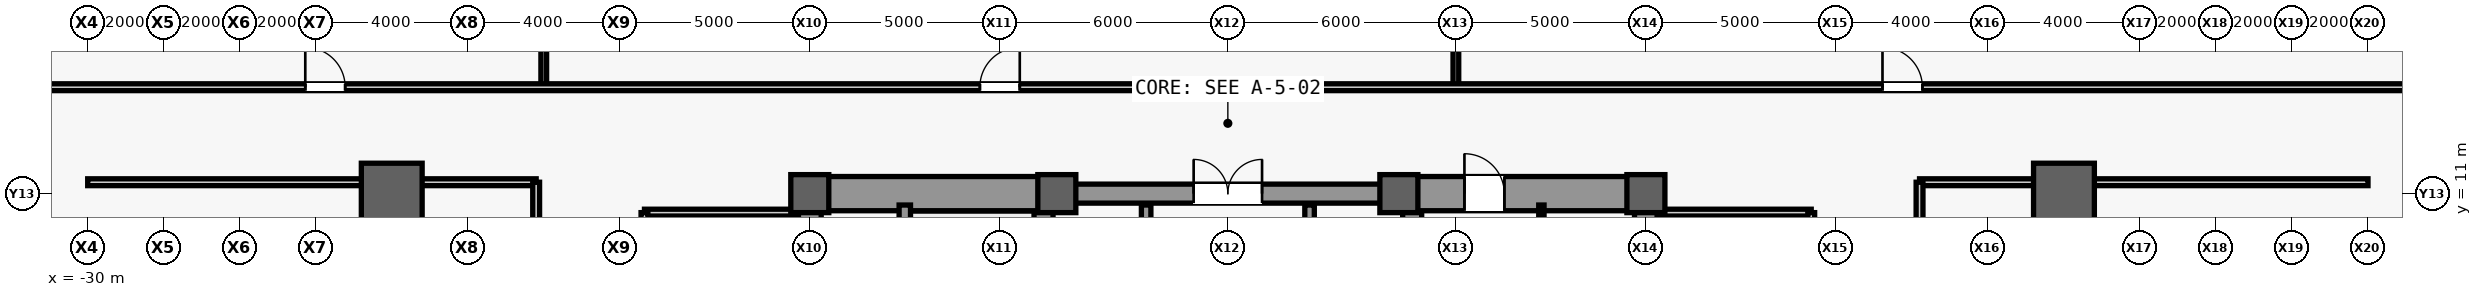
"""IFC4 building model, lengths in metres.
Left out: names, types, materials, properties, quantities, classifications, styles, units other than length and angle.
Written with IfcOpenShell. Run it as: python <this file> out.ifc"""

import sys

from ifc_helpers import new_model, si_unit, direction, frame, frame_2d, origin, origin_2d, place, context, subcontext, project, spatial, rectangle, extrude, source, transform, mapped, element, fill, save


model = new_model("IFC4")
c1 = context("Model", 3, precision=1e-05, world=origin(), true_north=direction((0.0, 1.0)))
c2 = subcontext(c1, "Body", "Model", "MODEL_VIEW")
j1 = project(units=[si_unit("LENGTHUNIT", "METRE"), si_unit("PLANEANGLEUNIT", "RADIAN")], contexts=[c1])
p1 = place(None, origin())
s1 = spatial("IfcSite", under=j1, at=p1, CompositionType="ELEMENT")
p2 = place(p1, origin())
s2 = spatial("IfcBuilding", under=s1, at=p2, CompositionType="ELEMENT")
p3 = place(p2, frame((0.0, 0.0, 12.0)))
s3 = spatial("IfcBuildingStorey", under=s2, at=p3, CompositionType="ELEMENT", Elevation=12.0)
m1 = source(origin(), c2, "Body", "SweptSolid", [
    extrude(rectangle(XDim=22.0, YDim=0.6, at=frame_2d((11.0, 0.0))), origin(), (0.0, 0.0, 1.0), 5.08),
])
p4 = place(p3, frame((-11.0, -11.0, 0.0), z_axis=(0.0, 0.0, 1.0), x_axis=(0.0, 1.0, 0.0)))
e1 = element("IfcWall", 1, at=p4, inside=s3, PredefinedType="SHEAR", context=c2, shape_type="MappedRepresentation", body=[
    mapped(m1, transform((0.0, 0.0, 0.0), scale=1.0)),
])
m2 = source(origin(), c2, "Body", "SweptSolid", [
    extrude(rectangle(XDim=1.1, YDim=2.2, at=frame_2d((0.55, 1.1))), frame((0.0, 0.31, 0.0), z_axis=(0.0, -1.0, 0.0), x_axis=(1.0, 0.0, 0.0)), (0.0, 0.0, 1.0), 0.62),
])
p5 = place(p4, frame((0.8, 0.0, 0.0)))
e2 = element("IfcOpeningElement", 2, at=p5, cuts=e1, PredefinedType="OPENING", context=c2, shape_type="MappedRepresentation", body=[
    mapped(m2, transform((0.0, 0.0, 0.0), scale=1.0)),
])
p6 = place(p4, frame((12.5, 0.0, 0.0)))
e3 = element("IfcOpeningElement", 3, at=p6, cuts=e1, PredefinedType="OPENING", context=c2, shape_type="MappedRepresentation", body=[
    mapped(m2, transform((0.0, 0.0, 0.0), scale=1.0)),
])
m3 = source(origin(), c2, "Body", "SweptSolid", [
    extrude(rectangle(XDim=0.9, YDim=2.15, at=frame_2d((0.45, 1.075))), frame((0.0, 0.31, 0.0), z_axis=(0.0, -1.0, 0.0), x_axis=(1.0, 0.0, 0.0)), (0.0, 0.0, 1.0), 0.62),
])
p7 = place(p4, frame((6.85, 0.0, 0.0)))
e4 = element("IfcOpeningElement", 4, at=p7, cuts=e1, PredefinedType="OPENING", context=c2, shape_type="MappedRepresentation", body=[
    mapped(m3, transform((0.0, 0.0, 0.0), scale=1.0)),
])
m4 = source(origin(), c2, "Body", "SweptSolid", [
    extrude(rectangle(XDim=1.3, YDim=2.3, at=frame_2d((0.65, 1.15))), frame((0.0, 0.31, 0.0), z_axis=(0.0, -1.0, 0.0), x_axis=(1.0, 0.0, 0.0)), (0.0, 0.0, 1.0), 0.62),
])
p8 = place(p4, frame((2.7, 0.0, 0.0)))
e5 = element("IfcOpeningElement", 5, at=p8, cuts=e1, PredefinedType="OPENING", context=c2, shape_type="MappedRepresentation", body=[
    mapped(m4, transform((0.0, 0.0, 0.0), scale=1.0)),
])
p9 = place(p3, frame((11.0, -11.0, 0.0), z_axis=(0.0, 0.0, 1.0), x_axis=(0.0, 1.0, 0.0)))
e6 = element("IfcWall", 6, at=p9, inside=s3, PredefinedType="SHEAR", context=c2, shape_type="MappedRepresentation", body=[
    mapped(m1, transform((0.0, 0.0, 0.0), scale=1.0)),
])
p10 = place(p9, frame((0.8, 0.0, 0.0)))
e7 = element("IfcOpeningElement", 7, at=p10, cuts=e6, PredefinedType="OPENING", context=c2, shape_type="MappedRepresentation", body=[
    mapped(m2, transform((0.0, 0.0, 0.0), scale=1.0)),
])
p11 = place(p9, frame((6.2, 0.0, 0.0)))
e8 = element("IfcOpeningElement", 8, at=p11, cuts=e6, PredefinedType="OPENING", context=c2, shape_type="MappedRepresentation", body=[
    mapped(m3, transform((0.0, 0.0, 0.0), scale=1.0)),
])
p12 = place(p9, frame((8.05, 0.0, 0.0)))
e9 = element("IfcOpeningElement", 9, at=p12, cuts=e6, PredefinedType="OPENING", context=c2, shape_type="MappedRepresentation", body=[
    mapped(m3, transform((0.0, 0.0, 0.0), scale=1.0)),
])
p13 = place(p9, frame((2.7, 0.0, 0.0)))
e10 = element("IfcOpeningElement", 10, at=p13, cuts=e6, PredefinedType="OPENING", context=c2, shape_type="MappedRepresentation", body=[
    mapped(m4, transform((0.0, 0.0, 0.0), scale=1.0)),
])
p14 = place(p9, frame((13.35, 0.0, 0.0)))
e11 = element("IfcOpeningElement", 11, at=p14, cuts=e6, PredefinedType="OPENING", context=c2, shape_type="MappedRepresentation", body=[
    mapped(m4, transform((0.0, 0.0, 0.0), scale=1.0)),
])
m5 = source(origin(), c2, "Body", "SweptSolid", [
    extrude(rectangle(XDim=21.4, YDim=0.5, at=frame_2d((10.7, 0.0))), origin(), (0.0, 0.0, 1.0), 5.08),
])
for number, where, z_axis, x_axis in (
    (12, (-4.85, -10.7, 0.0), (0.0, 0.0, 1.0), (0.0, 1.0, 0.0)),
    (13, (4.85, -10.7, 0.0), (0.0, 0.0, 1.0), (0.0, 1.0, 0.0)),
):
    element("IfcWall", number, at=place(p3, frame(where, z_axis=z_axis, x_axis=x_axis)), inside=s3, PredefinedType="SHEAR", context=c2, shape_type="MappedRepresentation", body=[
        mapped(m5, transform((0.0, 0.0, 0.0), scale=1.0)),
    ])
m6 = source(origin(), c2, "Body", "SweptSolid", [
    extrude(rectangle(XDim=5.85, YDim=0.9, at=frame_2d((2.925, 0.0))), origin(), (0.0, 0.0, 1.0), 5.08),
])
p15 = place(p3, frame((-10.7, 11.0, 0.0), z_axis=(0.0, 0.0, 1.0), x_axis=(1.0, 0.0, 0.0)))
e14 = element("IfcWall", 14, at=p15, inside=s3, PredefinedType="SHEAR", context=c2, shape_type="MappedRepresentation", body=[
    mapped(m6, transform((0.0, 0.0, 0.0), scale=1.0)),
])
p16 = place(p3, frame((4.85, 11.0, 0.0), z_axis=(0.0, 0.0, 1.0), x_axis=(1.0, 0.0, 0.0)))
e15 = element("IfcWall", 15, at=p16, inside=s3, PredefinedType="SHEAR", context=c2, shape_type="MappedRepresentation", body=[
    mapped(m6, transform((0.0, 0.0, 0.0), scale=1.0)),
])
m7 = source(origin(), c2, "Body", "SweptSolid", [
    extrude(rectangle(XDim=1.05, YDim=2.2, at=frame_2d((0.525, 1.1))), frame((0.0, 0.46, 0.0), z_axis=(0.0, -1.0, 0.0), x_axis=(1.0, 0.0, 0.0)), (0.0, 0.0, 1.0), 0.92),
])
p17 = place(p16, frame((1.375, 0.0, 0.0)))
e16 = element("IfcOpeningElement", 16, at=p17, cuts=e15, PredefinedType="OPENING", context=c2, shape_type="MappedRepresentation", body=[
    mapped(m7, transform((0.0, 0.0, 0.0), scale=1.0)),
])
m8 = source(origin(), c2, "Body", "SweptSolid", [
    extrude(rectangle(XDim=9.2, YDim=0.5, at=frame_2d((4.6, 0.0))), origin(), (0.0, 0.0, 1.0), 5.08),
])
p18 = place(p3, frame((-4.6, 11.0, 0.0), z_axis=(0.0, 0.0, 1.0), x_axis=(1.0, 0.0, 0.0)))
e17 = element("IfcWall", 17, at=p18, inside=s3, PredefinedType="SHEAR", context=c2, shape_type="MappedRepresentation", body=[
    mapped(m8, transform((0.0, 0.0, 0.0), scale=1.0)),
])
m9 = source(origin(), c2, "Body", "SweptSolid", [
    extrude(rectangle(XDim=1.8, YDim=2.25, at=frame_2d((0.9, 1.125))), frame((0.0, 0.26, 0.0), z_axis=(0.0, -1.0, 0.0), x_axis=(1.0, 0.0, 0.0)), (0.0, 0.0, 1.0), 0.52),
])
p19 = place(p18, frame((3.7, 0.0, 0.0)))
e18 = element("IfcOpeningElement", 18, at=p19, cuts=e17, PredefinedType="OPENING", context=c2, shape_type="MappedRepresentation", body=[
    mapped(m9, transform((0.0, 0.0, 0.0), scale=1.0)),
])
m10 = source(origin(), c2, "Body", "SweptSolid", [
    extrude(rectangle(XDim=1.6, YDim=1.6, at=origin_2d()), origin(), (0.0, 0.0, 1.0), 5.4),
])
p20 = place(p3, frame((-22.0, 11.0, 0.0), z_axis=(0.0, 0.0, 1.0), x_axis=(1.0, 0.0, 0.0)))
e19 = element("IfcColumn", 19, at=p20, inside=s3, PredefinedType="COLUMN", context=c2, shape_type="MappedRepresentation", body=[
    mapped(m10, transform((0.0, 0.0, 0.0), scale=1.0)),
])
m11 = source(origin(), c2, "Body", "SweptSolid", [
    extrude(rectangle(XDim=1.0, YDim=1.0, at=origin_2d()), origin(), (0.0, 0.0, 1.0), 5.4),
])
for number, where, z_axis, x_axis in (
    (20, (-11.0, 11.0, 0.0), (0.0, 0.0, 1.0), (1.0, 0.0, 0.0)),
    (21, (-4.5, 11.0, 0.0), (0.0, 0.0, 1.0), (1.0, 0.0, 0.0)),
    (22, (4.5, 11.0, 0.0), (0.0, 0.0, 1.0), (1.0, 0.0, 0.0)),
    (23, (11.0, 11.0, 0.0), (0.0, 0.0, 1.0), (1.0, 0.0, 0.0)),
):
    element("IfcColumn", number, at=place(p3, frame(where, z_axis=z_axis, x_axis=x_axis)), inside=s3, PredefinedType="COLUMN", context=c2, shape_type="MappedRepresentation", body=[
        mapped(m11, transform((0.0, 0.0, 0.0), scale=1.0)),
    ])
p21 = place(p3, frame((22.0, 11.0, 0.0), z_axis=(0.0, 0.0, 1.0), x_axis=(1.0, 0.0, 0.0)))
e24 = element("IfcColumn", 24, at=p21, inside=s3, PredefinedType="COLUMN", context=c2, shape_type="MappedRepresentation", body=[
    mapped(m10, transform((0.0, 0.0, 0.0), scale=1.0)),
])
m12 = source(origin(), c2, "Body", "SweptSolid", [
    extrude(rectangle(XDim=7.75, YDim=0.3, at=frame_2d((3.875, 0.0))), origin(), (0.0, 0.0, 1.0), 5.08),
])
p22 = place(p3, frame((-8.5, 2.95, 0.0), z_axis=(0.0, 0.0, 1.0), x_axis=(0.0, 1.0, 0.0)))
e25 = element("IfcWall", 25, at=p22, inside=s3, PredefinedType="SHEAR", context=c2, shape_type="MappedRepresentation", body=[
    mapped(m12, transform((0.0, 0.0, 0.0), scale=1.0)),
])
m13 = source(origin(), c2, "Body", "SweptSolid", [
    extrude(rectangle(XDim=9.4, YDim=0.14, at=frame_2d((4.7, 0.0))), origin(), (0.0, 0.0, 1.0), 5.08),
])
p23 = place(p3, frame((8.25, 1.3, 0.0), z_axis=(0.0, 0.0, 1.0), x_axis=(0.0, 1.0, 0.0)))
e26 = element("IfcWall", 26, at=p23, inside=s3, PredefinedType="PARTITIONING", context=c2, shape_type="MappedRepresentation", body=[
    mapped(m13, transform((0.0, 0.0, 0.0), scale=1.0)),
])
m14 = source(origin(), c2, "Body", "SweptSolid", [
    extrude(rectangle(XDim=4.05, YDim=0.18, at=frame_2d((2.025, 0.0))), origin(), (0.0, 0.0, 1.0), 5.08),
])
p24 = place(p3, frame((-15.35, 10.5, 0.0), z_axis=(0.0, 0.0, 1.0), x_axis=(1.0, 0.0, 0.0)))
e27 = element("IfcWall", 27, at=p24, inside=s3, PredefinedType="PARTITIONING", context=c2, shape_type="MappedRepresentation", body=[
    mapped(m14, transform((0.0, 0.0, 0.0), scale=1.0)),
])
m15 = source(origin(), c2, "Body", "SweptSolid", [
    extrude(rectangle(XDim=16.6, YDim=0.18, at=frame_2d((8.3, 0.0))), origin(), (0.0, 0.0, 1.0), 5.08),
])
p25 = place(p3, frame((-15.35, -6.1, 0.0), z_axis=(0.0, 0.0, 1.0), x_axis=(0.0, 1.0, 0.0)))
e28 = element("IfcWall", 28, at=p25, inside=s3, PredefinedType="PARTITIONING", context=c2, shape_type="MappedRepresentation", body=[
    mapped(m15, transform((0.0, 0.0, 0.0), scale=1.0)),
])
m16 = source(origin(), c2, "Body", "SweptSolid", [
    extrude(rectangle(XDim=1.8, YDim=2.25, at=frame_2d((0.9, 1.125))), frame((0.0, 0.1, 0.0), z_axis=(0.0, -1.0, 0.0), x_axis=(1.0, 0.0, 0.0)), (0.0, 0.0, 1.0), 0.2),
])
p26 = place(p25, frame((2.7, 0.0, 0.0)))
e29 = element("IfcOpeningElement", 29, at=p26, cuts=e28, PredefinedType="OPENING", context=c2, shape_type="MappedRepresentation", body=[
    mapped(m16, transform((0.0, 0.0, 0.0), scale=1.0)),
])
p27 = place(p25, frame((11.0, 0.0, 0.0)))
e30 = element("IfcOpeningElement", 30, at=p27, cuts=e28, PredefinedType="OPENING", context=c2, shape_type="MappedRepresentation", body=[
    mapped(m16, transform((0.0, 0.0, 0.0), scale=1.0)),
])
p28 = place(p3, frame((11.3, 10.5, 0.0), z_axis=(0.0, 0.0, 1.0), x_axis=(1.0, 0.0, 0.0)))
e31 = element("IfcWall", 31, at=p28, inside=s3, PredefinedType="PARTITIONING", context=c2, shape_type="MappedRepresentation", body=[
    mapped(m14, transform((0.0, 0.0, 0.0), scale=1.0)),
])
p29 = place(p3, frame((15.35, -6.1, 0.0), z_axis=(0.0, 0.0, 1.0), x_axis=(0.0, 1.0, 0.0)))
e32 = element("IfcWall", 32, at=p29, inside=s3, PredefinedType="PARTITIONING", context=c2, shape_type="MappedRepresentation", body=[
    mapped(m15, transform((0.0, 0.0, 0.0), scale=1.0)),
])
p30 = place(p29, frame((2.7, 0.0, 0.0)))
e33 = element("IfcOpeningElement", 33, at=p30, cuts=e32, PredefinedType="OPENING", context=c2, shape_type="MappedRepresentation", body=[
    mapped(m16, transform((0.0, 0.0, 0.0), scale=1.0)),
])
p31 = place(p29, frame((13.0, 0.0, 0.0)))
e34 = element("IfcOpeningElement", 34, at=p31, cuts=e32, PredefinedType="OPENING", context=c2, shape_type="MappedRepresentation", body=[
    mapped(m16, transform((0.0, 0.0, 0.0), scale=1.0)),
])
m17 = source(origin(), c2, "Body", "SweptSolid", [
    extrude(rectangle(XDim=5.4, YDim=0.25, at=frame_2d((2.7, 0.0))), origin(), (0.0, 0.0, 1.0), 5.08),
])
for number, where, z_axis, x_axis in (
    (35, (-2.15, 5.3, 0.0), (0.0, 0.0, 1.0), (0.0, 1.0, 0.0)),
    (36, (2.15, 5.3, 0.0), (0.0, 0.0, 1.0), (0.0, 1.0, 0.0)),
):
    element("IfcWall", number, at=place(p3, frame(where, z_axis=z_axis, x_axis=x_axis)), inside=s3, PredefinedType="SHEAR", context=c2, shape_type="MappedRepresentation", body=[
        mapped(m17, transform((0.0, 0.0, 0.0), scale=1.0)),
    ])
m18 = source(origin(), c2, "Body", "SweptSolid", [
    extrude(rectangle(XDim=22.2, YDim=0.15, at=frame_2d((11.1, 0.0))), origin(), (0.0, 0.0, 1.0), 5.08),
])
for number, where, z_axis, x_axis in (
    (37, (-18.0, 13.8, 0.0), (0.0, 0.0, 1.0), (0.0, 1.0, 0.0)),
    (38, (6.0, 13.8, 0.0), (0.0, 0.0, 1.0), (0.0, 1.0, 0.0)),
):
    element("IfcWall", number, at=place(p3, frame(where, z_axis=z_axis, x_axis=x_axis)), inside=s3, PredefinedType="PARTITIONING", context=c2, shape_type="MappedRepresentation", body=[
        mapped(m18, transform((0.0, 0.0, 0.0), scale=1.0)),
    ])
m19 = source(origin(), c2, "Body", "SweptSolid", [
    extrude(rectangle(XDim=84.0, YDim=0.18, at=frame_2d((42.0, 0.0))), origin(), (0.0, 0.0, 1.0), 5.08),
])
p32 = place(p3, frame((-42.0, 13.8, 0.0), z_axis=(0.0, 0.0, 1.0), x_axis=(1.0, 0.0, 0.0)))
e39 = element("IfcWall", 39, at=p32, inside=s3, PredefinedType="PARTITIONING", context=c2, shape_type="MappedRepresentation", body=[
    mapped(m19, transform((0.0, 0.0, 0.0), scale=1.0)),
])
m20 = source(origin(), c2, "Body", "SweptSolid", [
    extrude(rectangle(XDim=1.05, YDim=2.2, at=frame_2d((0.525, 1.1))), frame((0.0, 0.1, 0.0), z_axis=(0.0, -1.0, 0.0), x_axis=(1.0, 0.0, 0.0)), (0.0, 0.0, 1.0), 0.2),
])
p33 = place(p32, frame((17.725, 0.0, 0.0)))
e40 = element("IfcOpeningElement", 40, at=p33, cuts=e39, PredefinedType="OPENING", context=c2, shape_type="MappedRepresentation", body=[
    mapped(m20, transform((0.0, 0.0, 0.0), scale=1.0)),
])
p34 = place(p32, frame((35.475, 0.0, 0.0)))
e41 = element("IfcOpeningElement", 41, at=p34, cuts=e39, PredefinedType="OPENING", context=c2, shape_type="MappedRepresentation", body=[
    mapped(m20, transform((0.0, 0.0, 0.0), scale=1.0)),
])
p35 = place(p32, frame((59.225, 0.0, 0.0)))
e42 = element("IfcOpeningElement", 42, at=p35, cuts=e39, PredefinedType="OPENING", context=c2, shape_type="MappedRepresentation", body=[
    mapped(m20, transform((0.0, 0.0, 0.0), scale=1.0)),
])
m21 = source(origin(), c2, "Body", "SweptSolid", [
    extrude(rectangle(XDim=11.8, YDim=0.18, at=frame_2d((5.9, 0.0))), origin(), (0.0, 0.0, 1.0), 3.28),
])
for number, where, z_axis, x_axis in (
    (43, (-30.0, 11.3, 0.0), (0.0, 0.0, 1.0), (1.0, 0.0, 0.0)),
    (44, (18.2, 11.3, 0.0), (0.0, 0.0, 1.0), (1.0, 0.0, 0.0)),
):
    element("IfcWall", number, at=place(p3, frame(where, z_axis=z_axis, x_axis=x_axis)), inside=s3, PredefinedType="PARTITIONING", context=c2, shape_type="MappedRepresentation", body=[
        mapped(m21, transform((0.0, 0.0, 0.0), scale=1.0)),
    ])
m22 = source(origin(), c2, "Body", "SweptSolid", [
    extrude(rectangle(XDim=24.3, YDim=0.18, at=frame_2d((12.15, 0.0))), origin(), (0.0, 0.0, 1.0), 5.08),
])
p36 = place(p3, frame((-18.2, -13.0, 0.0), z_axis=(0.0, 0.0, 1.0), x_axis=(0.0, 1.0, 0.0)))
e45 = element("IfcWall", 45, at=p36, inside=s3, PredefinedType="PARTITIONING", context=c2, shape_type="MappedRepresentation", body=[
    mapped(m22, transform((0.0, 0.0, 0.0), scale=1.0)),
])
m23 = source(origin(), c2, "Body", "SweptSolid", [
    extrude(rectangle(XDim=0.95, YDim=2.15, at=frame_2d((0.475, 1.075))), frame((0.0, 0.1, 0.0), z_axis=(0.0, -1.0, 0.0), x_axis=(1.0, 0.0, 0.0)), (0.0, 0.0, 1.0), 0.2),
])
p37 = place(p36, frame((6.025, 0.0, 0.0)))
e46 = element("IfcOpeningElement", 46, at=p37, cuts=e45, PredefinedType="OPENING", context=c2, shape_type="MappedRepresentation", body=[
    mapped(m23, transform((0.0, 0.0, 0.0), scale=1.0)),
])
p38 = place(p36, frame((18.175, 0.0, 0.0)))
e47 = element("IfcOpeningElement", 47, at=p38, cuts=e45, PredefinedType="OPENING", context=c2, shape_type="MappedRepresentation", body=[
    mapped(m23, transform((0.0, 0.0, 0.0), scale=1.0)),
])
p39 = place(p3, frame((18.2, -13.0, 0.0), z_axis=(0.0, 0.0, 1.0), x_axis=(0.0, 1.0, 0.0)))
e48 = element("IfcWall", 48, at=p39, inside=s3, PredefinedType="PARTITIONING", context=c2, shape_type="MappedRepresentation", body=[
    mapped(m22, transform((0.0, 0.0, 0.0), scale=1.0)),
])
p40 = place(p39, frame((5.025, 0.0, 0.0)))
e49 = element("IfcOpeningElement", 49, at=p40, cuts=e48, PredefinedType="OPENING", context=c2, shape_type="MappedRepresentation", body=[
    mapped(m23, transform((0.0, 0.0, 0.0), scale=1.0)),
])
p41 = place(p39, frame((17.175, 0.0, 0.0)))
e50 = element("IfcOpeningElement", 50, at=p41, cuts=e48, PredefinedType="OPENING", context=c2, shape_type="MappedRepresentation", body=[
    mapped(m23, transform((0.0, 0.0, 0.0), scale=1.0)),
])
m24 = source(origin(), c2, "Body", "SweptSolid", [
    extrude(rectangle(XDim=1.05, YDim=2.2, at=frame_2d((0.525, 1.1))), frame((0.0, 0.025, 0.0), z_axis=(0.0, -1.0, 0.0), x_axis=(1.0, 0.0, 0.0)), (0.0, 0.0, 1.0), 0.05),
])
p42 = place(p17, origin())
e51 = element("IfcDoor", 51, at=p42, inside=s3, OperationType="SINGLE_SWING_LEFT", PredefinedType="DOOR", context=c2, shape_type="MappedRepresentation", body=[
    mapped(m24, transform((0.0, 0.0, 0.0), scale=1.0)),
])
fill(e16, e51)
m25 = source(origin(), c2, "Body", "SweptSolid", [
    extrude(rectangle(XDim=1.8, YDim=2.25, at=frame_2d((0.9, 1.125))), frame((0.0, 0.025, 0.0), z_axis=(0.0, -1.0, 0.0), x_axis=(1.0, 0.0, 0.0)), (0.0, 0.0, 1.0), 0.05),
])
p43 = place(p19, origin())
e52 = element("IfcDoor", 52, at=p43, inside=s3, OperationType="SINGLE_SWING_RIGHT", PredefinedType="DOOR", context=c2, shape_type="MappedRepresentation", body=[
    mapped(m25, transform((0.0, 0.0, 0.0), scale=1.0)),
])
fill(e18, e52)
p44 = place(p33, origin())
e53 = element("IfcDoor", 53, at=p44, inside=s3, OperationType="SINGLE_SWING_LEFT", PredefinedType="DOOR", context=c2, shape_type="MappedRepresentation", body=[
    mapped(m24, transform((0.0, 0.0, 0.0), scale=1.0)),
])
fill(e40, e53)
p45 = place(p34, origin())
e54 = element("IfcDoor", 54, at=p45, inside=s3, OperationType="SINGLE_SWING_RIGHT", PredefinedType="DOOR", context=c2, shape_type="MappedRepresentation", body=[
    mapped(m24, transform((0.0, 0.0, 0.0), scale=1.0)),
])
fill(e41, e54)
p46 = place(p35, origin())
e55 = element("IfcDoor", 55, at=p46, inside=s3, OperationType="SINGLE_SWING_LEFT", PredefinedType="DOOR", context=c2, shape_type="MappedRepresentation", body=[
    mapped(m24, transform((0.0, 0.0, 0.0), scale=1.0)),
])
fill(e42, e55)
save(model, sys.argv[1])
